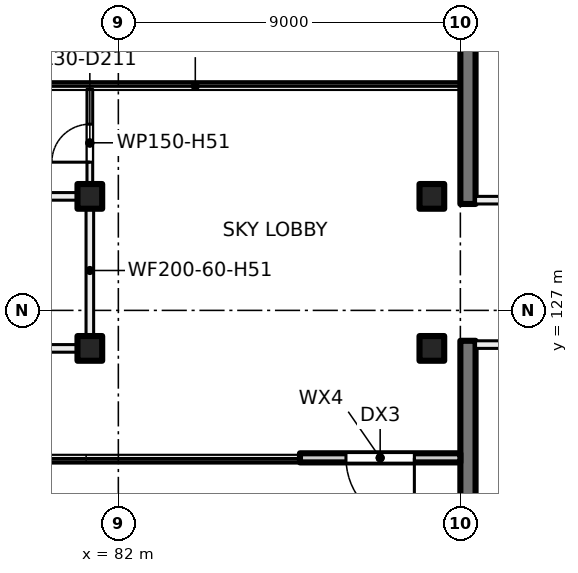
"""IFC4 building model, lengths in metres.
Left out: names, types, materials, properties, quantities, classifications, styles, units other than length and angle.
Written with IfcOpenShell. Run it as: python <this file> out.ifc"""

import sys

from ifc_helpers import new_model, si_unit, direction, frame, frame_2d, origin, origin_2d, place, context, subcontext, project, spatial, rectangle, extrude, element, fill, save


model = new_model("IFC4")
c1 = context("Model", 3, precision=1e-05, world=origin(), true_north=direction((0.0, 1.0)))
c2 = subcontext(c1, "Body", "Model", "MODEL_VIEW")
j1 = project(units=[si_unit("LENGTHUNIT", "METRE"), si_unit("PLANEANGLEUNIT", "RADIAN")], contexts=[c1])
p1 = place(None, origin())
s1 = spatial("IfcSite", under=j1, at=p1, CompositionType="ELEMENT")
p2 = place(p1, origin())
s2 = spatial("IfcBuilding", under=s1, at=p2, CompositionType="ELEMENT")
p3 = place(p2, frame((0.0, 0.0, 129.0)))
s3 = spatial("IfcBuildingStorey", under=s2, at=p3, CompositionType="ELEMENT", Elevation=129.0)
for number, where, z_axis, x_axis in (
    (1, (81.25, 130.0, 0.0), (0.0, 0.0, 1.0), (1.0, 0.0, 0.0)),
    (2, (90.25, 130.0, 0.0), (0.0, 0.0, 1.0), (1.0, 0.0, 0.0)),
    (3, (81.25, 126.0, 0.0), (0.0, 0.0, 1.0), (1.0, 0.0, 0.0)),
    (4, (90.25, 126.0, 0.0), (0.0, 0.0, 1.0), (1.0, 0.0, 0.0)),
):
    element("IfcColumn", number, at=place(p3, frame(where, z_axis=z_axis, x_axis=x_axis)), inside=s3, PredefinedType="COLUMN", context=c2, shape_type="SweptSolid", body=[
        extrude(rectangle(XDim=0.65, YDim=0.65, at=origin_2d()), origin(), (0.0, 0.0, 1.0), 5.5),
    ])
for number, where, z_axis, x_axis in (
    (5, (91.2, 138.4, 0.0), (0.0, 0.0, 1.0), (0.0, -1.0, 0.0)),
    (6, (91.2, 126.2, 0.0), (0.0, 0.0, 1.0), (0.0, -1.0, 0.0)),
):
    element("IfcWall", number, at=place(p3, frame(where, z_axis=z_axis, x_axis=x_axis)), inside=s3, PredefinedType="SHEAR", context=c2, shape_type="SweptSolid", body=[
        extrude(rectangle(XDim=8.6, YDim=0.4, at=frame_2d((4.3, 0.0))), origin(), (0.0, 0.0, 1.0), 5.5),
    ])
p4 = place(p3, frame((91.0, 123.12, 0.0), z_axis=(0.0, 0.0, 1.0), x_axis=(-1.0, 0.0, 0.0)))
e7 = element("IfcWall", 7, at=p4, inside=s3, PredefinedType="SOLIDWALL", context=c2, shape_type="SweptSolid", body=[
    extrude(rectangle(XDim=4.221, YDim=0.24, at=frame_2d((2.11, 0.0))), origin(), (0.0, 0.0, 1.0), 5.125),
])
p5 = place(p4, frame((1.21, 0.0, 0.0)))
e8 = element("IfcOpeningElement", 8, at=p5, cuts=e7, PredefinedType="OPENING", context=c2, shape_type="SweptSolid", body=[
    extrude(rectangle(XDim=1.8, YDim=2.4, at=frame_2d((0.9, 1.2))), frame((0.0, 0.13, 0.0), z_axis=(0.0, -1.0, 0.0), x_axis=(1.0, 0.0, 0.0)), (0.0, 0.0, 1.0), 0.26),
])
p6 = place(p3, frame((95.2, 126.1, 0.0), z_axis=(0.0, 0.0, 1.0), x_axis=(-1.0, 0.0, 0.0)))
e9 = element("IfcWall", 9, at=p6, inside=s3, PredefinedType="PARTITIONING", context=c2, shape_type="SweptSolid", body=[
    extrude(rectangle(XDim=3.8, YDim=0.2, at=frame_2d((1.9, 0.0))), origin(), (0.0, 0.0, 1.0), 5.125),
])
p7 = place(p6, frame((0.3, 0.0, 0.0)))
e10 = element("IfcOpeningElement", 10, at=p7, cuts=e9, PredefinedType="OPENING", context=c2, shape_type="SweptSolid", body=[
    extrude(rectangle(XDim=1.2, YDim=2.1, at=frame_2d((0.6, 1.05))), frame((0.0, 0.11, 0.0), z_axis=(0.0, -1.0, 0.0), x_axis=(1.0, 0.0, 0.0)), (0.0, 0.0, 1.0), 0.22),
])
p8 = place(p3, frame((91.4, 129.9, 0.0), z_axis=(0.0, 0.0, 1.0), x_axis=(1.0, 0.0, 0.0)))
e11 = element("IfcWall", 11, at=p8, inside=s3, PredefinedType="PARTITIONING", context=c2, shape_type="SweptSolid", body=[
    extrude(rectangle(XDim=3.8, YDim=0.2, at=frame_2d((1.9, 0.0))), origin(), (0.0, 0.0, 1.0), 5.125),
])
p9 = place(p8, frame((2.3, 0.0, 0.0)))
e12 = element("IfcOpeningElement", 12, at=p9, cuts=e11, PredefinedType="OPENING", context=c2, shape_type="SweptSolid", body=[
    extrude(rectangle(XDim=1.2, YDim=2.1, at=frame_2d((0.6, 1.05))), frame((0.0, 0.11, 0.0), z_axis=(0.0, -1.0, 0.0), x_axis=(1.0, 0.0, 0.0)), (0.0, 0.0, 1.0), 0.22),
])
p10 = place(p3, frame((46.1, 126.0, 0.0), z_axis=(0.0, 0.0, 1.0), x_axis=(1.0, 0.0, 0.0)))
e13 = element("IfcWall", 13, at=p10, inside=s3, PredefinedType="PARTITIONING", context=c2, shape_type="SweptSolid", body=[
    extrude(rectangle(XDim=35.25, YDim=0.2, at=frame_2d((17.625, 0.0))), origin(), (0.0, 0.0, 1.0), 5.125),
])
p11 = place(p10, frame((3.525, 0.0, 0.0)))
e14 = element("IfcOpeningElement", 14, at=p11, cuts=e13, PredefinedType="OPENING", context=c2, shape_type="SweptSolid", body=[
    extrude(rectangle(XDim=1.0, YDim=2.1, at=frame_2d((0.5, 1.05))), frame((0.0, 0.11, 0.0), z_axis=(0.0, -1.0, 0.0), x_axis=(1.0, 0.0, 0.0)), (0.0, 0.0, 1.0), 0.22),
])
p12 = place(p10, frame((12.15, 0.0, 0.0)))
e15 = element("IfcOpeningElement", 15, at=p12, cuts=e13, PredefinedType="OPENING", context=c2, shape_type="SweptSolid", body=[
    extrude(rectangle(XDim=1.0, YDim=2.1, at=frame_2d((0.5, 1.05))), frame((0.0, 0.11, 0.0), z_axis=(0.0, -1.0, 0.0), x_axis=(1.0, 0.0, 0.0)), (0.0, 0.0, 1.0), 0.22),
])
p13 = place(p10, frame((21.15, 0.0, 0.0)))
e16 = element("IfcOpeningElement", 16, at=p13, cuts=e13, PredefinedType="OPENING", context=c2, shape_type="SweptSolid", body=[
    extrude(rectangle(XDim=1.0, YDim=2.1, at=frame_2d((0.5, 1.05))), frame((0.0, 0.11, 0.0), z_axis=(0.0, -1.0, 0.0), x_axis=(1.0, 0.0, 0.0)), (0.0, 0.0, 1.0), 0.22),
])
p14 = place(p10, frame((30.15, 0.0, 0.0)))
e17 = element("IfcOpeningElement", 17, at=p14, cuts=e13, PredefinedType="OPENING", context=c2, shape_type="SweptSolid", body=[
    extrude(rectangle(XDim=1.0, YDim=2.1, at=frame_2d((0.5, 1.05))), frame((0.0, 0.11, 0.0), z_axis=(0.0, -1.0, 0.0), x_axis=(1.0, 0.0, 0.0)), (0.0, 0.0, 1.0), 0.22),
])
p15 = place(p3, frame((81.15, 130.0, 0.0), z_axis=(0.0, 0.0, 1.0), x_axis=(-1.0, 0.0, 0.0)))
e18 = element("IfcWall", 18, at=p15, inside=s3, PredefinedType="PARTITIONING", context=c2, shape_type="SweptSolid", body=[
    extrude(rectangle(XDim=8.75, YDim=0.2, at=frame_2d((4.375, 0.0))), origin(), (0.0, 0.0, 1.0), 5.125),
])
p16 = place(p15, frame((3.825, 0.0, 0.0)))
e19 = element("IfcOpeningElement", 19, at=p16, cuts=e18, PredefinedType="OPENING", context=c2, shape_type="SweptSolid", body=[
    extrude(rectangle(XDim=1.0, YDim=2.1, at=frame_2d((0.5, 1.05))), frame((0.0, 0.11, 0.0), z_axis=(0.0, -1.0, 0.0), x_axis=(1.0, 0.0, 0.0)), (0.0, 0.0, 1.0), 0.22),
])
p17 = place(p3, frame((81.25, 126.1, 0.0), z_axis=(0.0, 0.0, 1.0), x_axis=(0.0, 1.0, 0.0)))
e20 = element("IfcWall", 20, at=p17, inside=s3, PredefinedType="PARTITIONING", context=c2, shape_type="SweptSolid", body=[
    extrude(rectangle(XDim=3.9, YDim=0.2, at=frame_2d((1.95, 0.0))), origin(), (0.0, 0.0, 1.0), 5.125),
])
p18 = place(p3, frame((81.25, 130.0, 0.0), z_axis=(0.0, 0.0, 1.0), x_axis=(0.0, 1.0, 0.0)))
e21 = element("IfcWall", 21, at=p18, inside=s3, PredefinedType="PARTITIONING", context=c2, shape_type="SweptSolid", body=[
    extrude(rectangle(XDim=2.82, YDim=0.15, at=frame_2d((1.41, 0.0))), origin(), (0.0, 0.0, 1.0), 5.125),
])
p19 = place(p18, frame((0.9, 0.0, 0.0)))
e22 = element("IfcOpeningElement", 22, at=p19, cuts=e21, PredefinedType="OPENING", context=c2, shape_type="SweptSolid", body=[
    extrude(rectangle(XDim=1.0, YDim=2.1, at=frame_2d((0.5, 1.05))), frame((0.0, 0.085, 0.0), z_axis=(0.0, -1.0, 0.0), x_axis=(1.0, 0.0, 0.0)), (0.0, 0.0, 1.0), 0.17),
])
p20 = place(p5, origin())
e23 = element("IfcDoor", 23, at=p20, inside=s3, OperationType="DOUBLE_DOOR_SINGLE_SWING", PredefinedType="DOOR", context=c2, shape_type="SweptSolid", body=[
    extrude(rectangle(XDim=1.8, YDim=2.4, at=frame_2d((0.9, 1.2))), frame((0.0, 0.025, 0.0), z_axis=(0.0, -1.0, 0.0), x_axis=(1.0, 0.0, 0.0)), (0.0, 0.0, 1.0), 0.05),
])
fill(e8, e23)
p21 = place(p19, origin())
e24 = element("IfcDoor", 24, at=p21, inside=s3, OperationType="SINGLE_SWING_LEFT", PredefinedType="DOOR", context=c2, shape_type="SweptSolid", body=[
    extrude(rectangle(XDim=1.0, YDim=2.1, at=frame_2d((0.5, 1.05))), frame((0.0, 0.025, 0.0), z_axis=(0.0, -1.0, 0.0), x_axis=(1.0, 0.0, 0.0)), (0.0, 0.0, 1.0), 0.05),
])
fill(e22, e24)
save(model, sys.argv[1])
